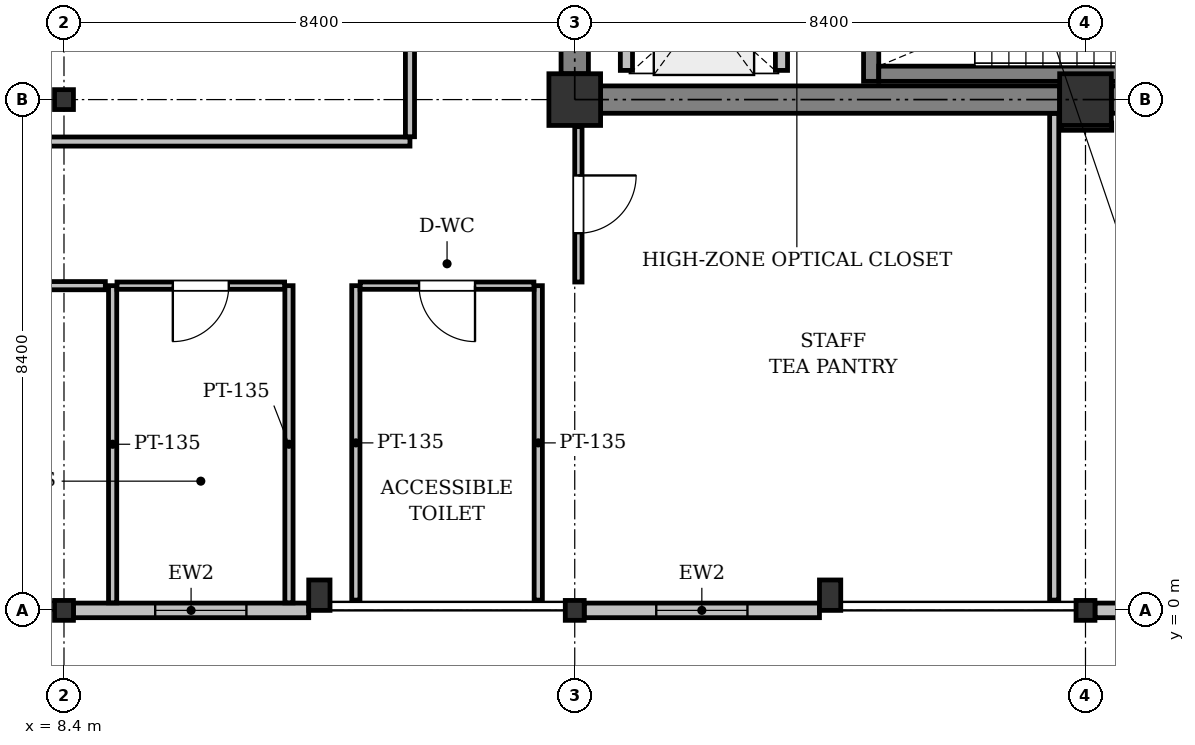
"""IFC4 building model, lengths in metres.
Left out: names, types, materials, properties, quantities, classifications, styles, units other than length and angle.
Written with IfcOpenShell. Run it as: python <this file> out.ifc"""

import sys

from ifc_helpers import new_model, si_unit, direction, frame, frame_2d, origin, origin_2d, place, context, subcontext, project, spatial, rectangle, i_section, extrude, element, fill, save


model = new_model("IFC4")
c1 = context("Model", 3, precision=1e-05, world=origin(), true_north=direction((0.0, 1.0)))
c2 = subcontext(c1, "Body", "Model", "MODEL_VIEW")
j1 = project(units=[si_unit("LENGTHUNIT", "METRE"), si_unit("PLANEANGLEUNIT", "RADIAN")], contexts=[c1])
p1 = place(None, origin())
s1 = spatial("IfcSite", under=j1, at=p1, CompositionType="ELEMENT")
p2 = place(p1, origin())
s2 = spatial("IfcBuilding", under=s1, at=p2, CompositionType="ELEMENT")
p3 = place(p2, frame((0.0, 0.0, 250.2)))
s3 = spatial("IfcBuildingStorey", under=s2, at=p3, CompositionType="ELEMENT", Elevation=250.2)
for number, where, z_axis, x_axis in (
    (1, (8.4, 0.0, 0.0), (0.0, 0.0, 1.0), (1.0, 0.0, 0.0)),
    (2, (8.4, 8.4, 0.0), (0.0, 0.0, 1.0), (1.0, 0.0, 0.0)),
    (3, (16.8, 0.0, 0.0), (0.0, 0.0, 1.0), (1.0, 0.0, 0.0)),
):
    element("IfcColumn", number, at=place(p3, frame(where, z_axis=z_axis, x_axis=x_axis)), inside=s3, PredefinedType="COLUMN", context=c2, shape_type="SweptSolid", body=[
        extrude(i_section(OverallWidth=0.311, OverallDepth=0.327, WebThickness=0.016, FlangeThickness=0.025, FilletRadius=0.017, at=origin_2d()), origin(), (0.0, 0.0, 1.0), 4.0),
    ])
p4 = place(p3, frame((16.8, 8.4, 0.0), z_axis=(0.0, 0.0, 1.0), x_axis=(1.0, 0.0, 0.0)))
e4 = element("IfcColumn", 4, at=p4, inside=s3, PredefinedType="COLUMN", context=c2, shape_type="SweptSolid", body=[
    extrude(rectangle(XDim=0.85, YDim=0.85, at=origin_2d()), origin(), (0.0, 0.0, 1.0), 4.0),
])
p5 = place(p3, frame((25.2, 0.0, 0.0), z_axis=(0.0, 0.0, 1.0), x_axis=(1.0, 0.0, 0.0)))
e5 = element("IfcColumn", 5, at=p5, inside=s3, PredefinedType="COLUMN", context=c2, shape_type="SweptSolid", body=[
    extrude(i_section(OverallWidth=0.311, OverallDepth=0.327, WebThickness=0.016, FlangeThickness=0.025, FilletRadius=0.017, at=origin_2d()), origin(), (0.0, 0.0, 1.0), 4.0),
])
p6 = place(p3, frame((25.2, 8.4, 0.0), z_axis=(0.0, 0.0, 1.0), x_axis=(1.0, 0.0, 0.0)))
e6 = element("IfcColumn", 6, at=p6, inside=s3, PredefinedType="COLUMN", context=c2, shape_type="SweptSolid", body=[
    extrude(rectangle(XDim=0.85, YDim=0.85, at=origin_2d()), origin(), (0.0, 0.0, 1.0), 4.0),
])
for number, where, z_axis, x_axis in (
    (7, (12.6, 0.25, 0.0), (0.0, 0.0, 1.0), (1.0, 0.0, 0.0)),
    (8, (21.0, 0.25, 0.0), (0.0, 0.0, 1.0), (1.0, 0.0, 0.0)),
):
    element("IfcColumn", number, at=place(p3, frame(where, z_axis=z_axis, x_axis=x_axis)), inside=s3, PredefinedType="PILASTER", context=c2, shape_type="SweptSolid", body=[
        extrude(rectangle(XDim=0.35, YDim=0.5, at=origin_2d()), origin(), (0.0, 0.0, 1.0), 4.0),
    ])
p7 = place(p3, frame((33.445, 0.0, 0.0), z_axis=(0.0, 0.0, 1.0), x_axis=(-1.0, 0.0, 0.0)))
e9 = element("IfcWall", 9, at=p7, inside=s3, PredefinedType="STANDARD", context=c2, shape_type="SweptSolid", body=[
    extrude(rectangle(XDim=8.089, YDim=0.24, at=frame_2d((4.044, 0.0))), origin(), (0.0, 0.0, 1.0), 3.475),
])
p8 = place(p7, frame((3.294, 0.0, 0.9)))
e10 = element("IfcOpeningElement", 10, at=p8, cuts=e9, PredefinedType="OPENING", context=c2, shape_type="SweptSolid", body=[
    extrude(rectangle(XDim=1.5, YDim=1.6, at=frame_2d((0.75, 0.8))), frame((0.0, 0.13, 0.0), z_axis=(0.0, -1.0, 0.0), x_axis=(1.0, 0.0, 0.0)), (0.0, 0.0, 1.0), 0.26),
])
p9 = place(p3, frame((20.825, 0.0, 0.0), z_axis=(0.0, 0.0, 1.0), x_axis=(-1.0, 0.0, 0.0)))
e11 = element("IfcWall", 11, at=p9, inside=s3, PredefinedType="STANDARD", context=c2, shape_type="SweptSolid", body=[
    extrude(rectangle(XDim=3.869, YDim=0.24, at=frame_2d((1.935, 0.0))), origin(), (0.0, 0.0, 1.0), 3.475),
])
p10 = place(p9, frame((1.185, 0.0, 0.9)))
e12 = element("IfcOpeningElement", 12, at=p10, cuts=e11, PredefinedType="OPENING", context=c2, shape_type="SweptSolid", body=[
    extrude(rectangle(XDim=1.5, YDim=1.6, at=frame_2d((0.75, 0.8))), frame((0.0, 0.13, 0.0), z_axis=(0.0, -1.0, 0.0), x_axis=(1.0, 0.0, 0.0)), (0.0, 0.0, 1.0), 0.26),
])
p11 = place(p3, frame((12.425, 0.0, 0.0), z_axis=(0.0, 0.0, 1.0), x_axis=(-1.0, 0.0, 0.0)))
e13 = element("IfcWall", 13, at=p11, inside=s3, PredefinedType="STANDARD", context=c2, shape_type="SweptSolid", body=[
    extrude(rectangle(XDim=3.87, YDim=0.24, at=frame_2d((1.935, 0.0))), origin(), (0.0, 0.0, 1.0), 3.475),
])
p12 = place(p11, frame((1.025, 0.0, 0.9)))
e14 = element("IfcOpeningElement", 14, at=p12, cuts=e13, PredefinedType="OPENING", context=c2, shape_type="SweptSolid", body=[
    extrude(rectangle(XDim=1.5, YDim=1.6, at=frame_2d((0.75, 0.8))), frame((0.0, 0.13, 0.0), z_axis=(0.0, -1.0, 0.0), x_axis=(1.0, 0.0, 0.0)), (0.0, 0.0, 1.0), 0.26),
])
p13 = place(p3, frame((17.225, 8.4, 0.0), z_axis=(0.0, 0.0, 1.0), x_axis=(1.0, 0.0, 0.0)))
e15 = element("IfcWall", 15, at=p13, inside=s3, PredefinedType="SHEAR", context=c2, shape_type="SweptSolid", body=[
    extrude(rectangle(XDim=7.55, YDim=0.45, at=frame_2d((3.775, 0.0))), origin(), (0.0, 0.0, 1.0), 3.725),
])
p14 = place(p3, frame((25.625, 8.4, 0.0), z_axis=(0.0, 0.0, 1.0), x_axis=(1.0, 0.0, 0.0)))
e16 = element("IfcWall", 16, at=p14, inside=s3, PredefinedType="SHEAR", context=c2, shape_type="SweptSolid", body=[
    extrude(rectangle(XDim=7.55, YDim=0.45, at=frame_2d((3.775, 0.0))), origin(), (0.0, 0.0, 1.0), 3.725),
])
p15 = place(p3, frame((16.8, 8.825, 0.0), z_axis=(0.0, 0.0, 1.0), x_axis=(0.0, 1.0, 0.0)))
e17 = element("IfcWall", 17, at=p15, inside=s3, PredefinedType="SHEAR", context=c2, shape_type="SweptSolid", body=[
    extrude(rectangle(XDim=7.55, YDim=0.45, at=frame_2d((3.775, 0.0))), origin(), (0.0, 0.0, 1.0), 3.725),
])
p16 = place(p15, frame((3.425, 0.0, 0.0)))
e18 = element("IfcOpeningElement", 18, at=p16, cuts=e17, PredefinedType="OPENING", context=c2, shape_type="SweptSolid", body=[
    extrude(rectangle(XDim=1.1, YDim=2.15, at=frame_2d((0.55, 1.075))), frame((0.0, 0.235, 0.0), z_axis=(0.0, -1.0, 0.0), x_axis=(1.0, 0.0, 0.0)), (0.0, 0.0, 1.0), 0.47),
])
p17 = place(p3, frame((21.675, 8.7, 0.0), z_axis=(0.0, 0.0, 1.0), x_axis=(0.0, 1.0, 0.0)))
e19 = element("IfcWall", 19, at=p17, inside=s3, PredefinedType="SHEAR", context=c2, shape_type="SweptSolid", body=[
    extrude(rectangle(XDim=3.75, YDim=0.25, at=frame_2d((1.875, 0.0))), origin(), (0.0, 0.0, 1.0), 3.725),
])
p18 = place(p3, frame((21.8, 8.825, 0.0), z_axis=(0.0, 0.0, 1.0), x_axis=(1.0, 0.0, 0.0)))
e20 = element("IfcWall", 20, at=p18, inside=s3, PredefinedType="SHEAR", context=c2, shape_type="SweptSolid", body=[
    extrude(rectangle(XDim=7.75, YDim=0.25, at=frame_2d((3.875, 0.0))), origin(), (0.0, 0.0, 1.0), 3.725),
])
for number, where, z_axis, x_axis in (
    (21, (20.2, 8.88, 0.0), (0.0, 0.0, 1.0), (0.0, 1.0, 0.0)),
    (22, (17.65, 8.88, 0.0), (0.0, 0.0, 1.0), (0.0, 1.0, 0.0)),
):
    element("IfcWall", number, at=place(p3, frame(where, z_axis=z_axis, x_axis=x_axis)), inside=s3, PredefinedType="PARTITIONING", context=c2, shape_type="SweptSolid", body=[
        extrude(rectangle(XDim=2.1, YDim=0.2, at=frame_2d((1.05, 0.0))), origin(), (0.0, 0.0, 1.0), 3.725),
    ])
for number, where, z_axis, x_axis in (
    (23, (13.2, 5.34, 0.0), (0.0, 0.0, 1.0), (0.0, -1.0, 0.0)),
    (24, (16.2, 0.169, 0.0), (0.0, 0.0, 1.0), (0.0, 1.0, 0.0)),
):
    element("IfcWall", number, at=place(p3, frame(where, z_axis=z_axis, x_axis=x_axis)), inside=s3, PredefinedType="PARTITIONING", context=c2, shape_type="SweptSolid", body=[
        extrude(rectangle(XDim=5.171, YDim=0.135, at=frame_2d((2.585, 0.0))), origin(), (0.0, 0.0, 1.0), 3.725),
    ])
p19 = place(p3, frame((16.128, 5.34, 0.0), z_axis=(0.0, 0.0, 1.0), x_axis=(-1.0, 0.0, 0.0)))
e25 = element("IfcWall", 25, at=p19, inside=s3, PredefinedType="PARTITIONING", context=c2, shape_type="SweptSolid", body=[
    extrude(rectangle(XDim=2.857, YDim=0.12, at=frame_2d((1.428, 0.0))), origin(), (0.0, 0.0, 1.0), 3.725),
])
p20 = place(p19, frame((0.969, 0.0, 0.0)))
e26 = element("IfcOpeningElement", 26, at=p20, cuts=e25, PredefinedType="OPENING", context=c2, shape_type="SweptSolid", body=[
    extrude(rectangle(XDim=0.92, YDim=2.1, at=frame_2d((0.46, 1.05))), frame((0.0, 0.07, 0.0), z_axis=(0.0, -1.0, 0.0), x_axis=(1.0, 0.0, 0.0)), (0.0, 0.0, 1.0), 0.14),
])
for number, where, z_axis, x_axis in (
    (27, (9.2, 5.34, 0.0), (0.0, 0.0, 1.0), (0.0, -1.0, 0.0)),
    (28, (12.1, 0.124, 0.0), (0.0, 0.0, 1.0), (0.0, 1.0, 0.0)),
):
    element("IfcWall", number, at=place(p3, frame(where, z_axis=z_axis, x_axis=x_axis)), inside=s3, PredefinedType="PARTITIONING", context=c2, shape_type="SweptSolid", body=[
        extrude(rectangle(XDim=5.216, YDim=0.135, at=frame_2d((2.608, 0.0))), origin(), (0.0, 0.0, 1.0), 3.725),
    ])
p21 = place(p3, frame((12.029, 5.34, 0.0), z_axis=(0.0, 0.0, 1.0), x_axis=(-1.0, 0.0, 0.0)))
e29 = element("IfcWall", 29, at=p21, inside=s3, PredefinedType="PARTITIONING", context=c2, shape_type="SweptSolid", body=[
    extrude(rectangle(XDim=2.757, YDim=0.12, at=frame_2d((1.378, 0.0))), origin(), (0.0, 0.0, 1.0), 3.725),
])
p22 = place(p21, frame((0.918, 0.0, 0.0)))
e30 = element("IfcOpeningElement", 30, at=p22, cuts=e29, PredefinedType="OPENING", context=c2, shape_type="SweptSolid", body=[
    extrude(rectangle(XDim=0.92, YDim=2.1, at=frame_2d((0.46, 1.05))), frame((0.0, 0.07, 0.0), z_axis=(0.0, -1.0, 0.0), x_axis=(1.0, 0.0, 0.0)), (0.0, 0.0, 1.0), 0.14),
])
p23 = place(p3, frame((24.686, 0.169, 0.0), z_axis=(0.0, 0.0, 1.0), x_axis=(0.0, 1.0, 0.0)))
e31 = element("IfcWall", 31, at=p23, inside=s3, PredefinedType="PARTITIONING", context=c2, shape_type="SweptSolid", body=[
    extrude(rectangle(XDim=8.002, YDim=0.15, at=frame_2d((4.001, 0.0))), origin(), (0.0, 0.0, 1.0), 3.725),
])
p24 = place(p3, frame((16.86, 7.955, 0.0), z_axis=(0.0, 0.0, 1.0), x_axis=(0.0, -1.0, 0.0)))
e32 = element("IfcWall", 32, at=p24, inside=s3, PredefinedType="PARTITIONING", context=c2, shape_type="SweptSolid", body=[
    extrude(rectangle(XDim=2.555, YDim=0.12, at=frame_2d((1.278, 0.0))), origin(), (0.0, 0.0, 1.0), 3.319),
])
p25 = place(p24, frame((0.802, 0.0, 0.0)))
e33 = element("IfcOpeningElement", 33, at=p25, cuts=e32, PredefinedType="OPENING", context=c2, shape_type="SweptSolid", body=[
    extrude(rectangle(XDim=0.95, YDim=2.15, at=frame_2d((0.475, 1.075))), frame((0.0, 0.07, 0.0), z_axis=(0.0, -1.0, 0.0), x_axis=(1.0, 0.0, 0.0)), (0.0, 0.0, 1.0), 0.14),
])
p26 = place(p3, frame((25.631, 7.956, 0.0), z_axis=(0.0, 0.0, 1.0), x_axis=(-0.999999606339, -0.000887311097, 0.0)))
e34 = element("IfcWall", 34, at=p26, inside=s3, PredefinedType="PARTITIONING", context=c2, shape_type="SweptSolid", body=[
    extrude(rectangle(XDim=0.825, YDim=0.12, at=frame_2d((0.413, 0.0))), origin(), (0.0, 0.0, 1.0), 3.319),
])
p27 = place(p3, frame((5.4, 7.71, 0.0), z_axis=(0.0, 0.0, 1.0), x_axis=(1.0, 0.0, 0.0)))
e35 = element("IfcWall", 35, at=p27, inside=s3, PredefinedType="PARTITIONING", context=c2, shape_type="SweptSolid", body=[
    extrude(rectangle(XDim=8.69, YDim=0.15, at=frame_2d((4.345, 0.0))), origin(), (0.0, 0.0, 1.0), 3.319),
])
p28 = place(p3, frame((14.09, 7.789, 0.0), z_axis=(0.0, 0.0, 1.0), x_axis=(0.0, 1.0, 0.0)))
e36 = element("IfcWall", 36, at=p28, inside=s3, PredefinedType="PARTITIONING", context=c2, shape_type="SweptSolid", body=[
    extrude(rectangle(XDim=10.566, YDim=0.15, at=frame_2d((5.283, 0.0))), origin(), (0.0, 0.0, 1.0), 3.271),
])
p29 = place(p28, frame((4.808, 0.0, 0.0)))
e37 = element("IfcOpeningElement", 37, at=p29, cuts=e36, PredefinedType="OPENING", context=c2, shape_type="SweptSolid", body=[
    extrude(rectangle(XDim=0.95, YDim=2.15, at=frame_2d((0.475, 1.075))), frame((0.0, 0.085, 0.0), z_axis=(0.0, -1.0, 0.0), x_axis=(1.0, 0.0, 0.0)), (0.0, 0.0, 1.0), 0.17),
])
p30 = place(p3, frame((9.08, 5.34, 0.0), z_axis=(0.0, 0.0, 1.0), x_axis=(-1.0, 0.0, 0.0)))
e38 = element("IfcWall", 38, at=p30, inside=s3, PredefinedType="PARTITIONING", context=c2, shape_type="SweptSolid", body=[
    extrude(rectangle(XDim=3.68, YDim=0.135, at=frame_2d((1.84, 0.0))), origin(), (0.0, 0.0, 1.0), 3.319),
])
p31 = place(p10, origin())
e39 = element("IfcWindow", 39, at=p31, inside=s3, PartitioningType="SINGLE_PANEL", PredefinedType="WINDOW", context=c2, shape_type="SweptSolid", body=[
    extrude(rectangle(XDim=1.5, YDim=1.6, at=frame_2d((0.75, 0.8))), frame((0.0, 0.03, 0.0), z_axis=(0.0, -1.0, 0.0), x_axis=(1.0, 0.0, 0.0)), (0.0, 0.0, 1.0), 0.06),
])
fill(e12, e39)
p32 = place(p12, origin())
e40 = element("IfcWindow", 40, at=p32, inside=s3, PartitioningType="SINGLE_PANEL", PredefinedType="WINDOW", context=c2, shape_type="SweptSolid", body=[
    extrude(rectangle(XDim=1.5, YDim=1.6, at=frame_2d((0.75, 0.8))), frame((0.0, 0.03, 0.0), z_axis=(0.0, -1.0, 0.0), x_axis=(1.0, 0.0, 0.0)), (0.0, 0.0, 1.0), 0.06),
])
fill(e14, e40)
p33 = place(p20, origin())
e41 = element("IfcDoor", 41, at=p33, inside=s3, OperationType="SINGLE_SWING_LEFT", PredefinedType="DOOR", context=c2, shape_type="SweptSolid", body=[
    extrude(rectangle(XDim=0.92, YDim=2.1, at=frame_2d((0.46, 1.05))), frame((0.0, 0.025, 0.0), z_axis=(0.0, -1.0, 0.0), x_axis=(1.0, 0.0, 0.0)), (0.0, 0.0, 1.0), 0.05),
])
fill(e26, e41)
p34 = place(p22, origin())
e42 = element("IfcDoor", 42, at=p34, inside=s3, OperationType="SINGLE_SWING_RIGHT", PredefinedType="DOOR", context=c2, shape_type="SweptSolid", body=[
    extrude(rectangle(XDim=0.92, YDim=2.1, at=frame_2d((0.46, 1.05))), frame((0.0, 0.025, 0.0), z_axis=(0.0, -1.0, 0.0), x_axis=(1.0, 0.0, 0.0)), (0.0, 0.0, 1.0), 0.05),
])
fill(e30, e42)
p35 = place(p25, origin())
e43 = element("IfcDoor", 43, at=p35, inside=s3, OperationType="SINGLE_SWING_LEFT", PredefinedType="DOOR", context=c2, shape_type="SweptSolid", body=[
    extrude(rectangle(XDim=0.95, YDim=2.15, at=frame_2d((0.475, 1.075))), frame((0.0, 0.025, 0.0), z_axis=(0.0, -1.0, 0.0), x_axis=(1.0, 0.0, 0.0)), (0.0, 0.0, 1.0), 0.05),
])
fill(e33, e43)
save(model, sys.argv[1])
